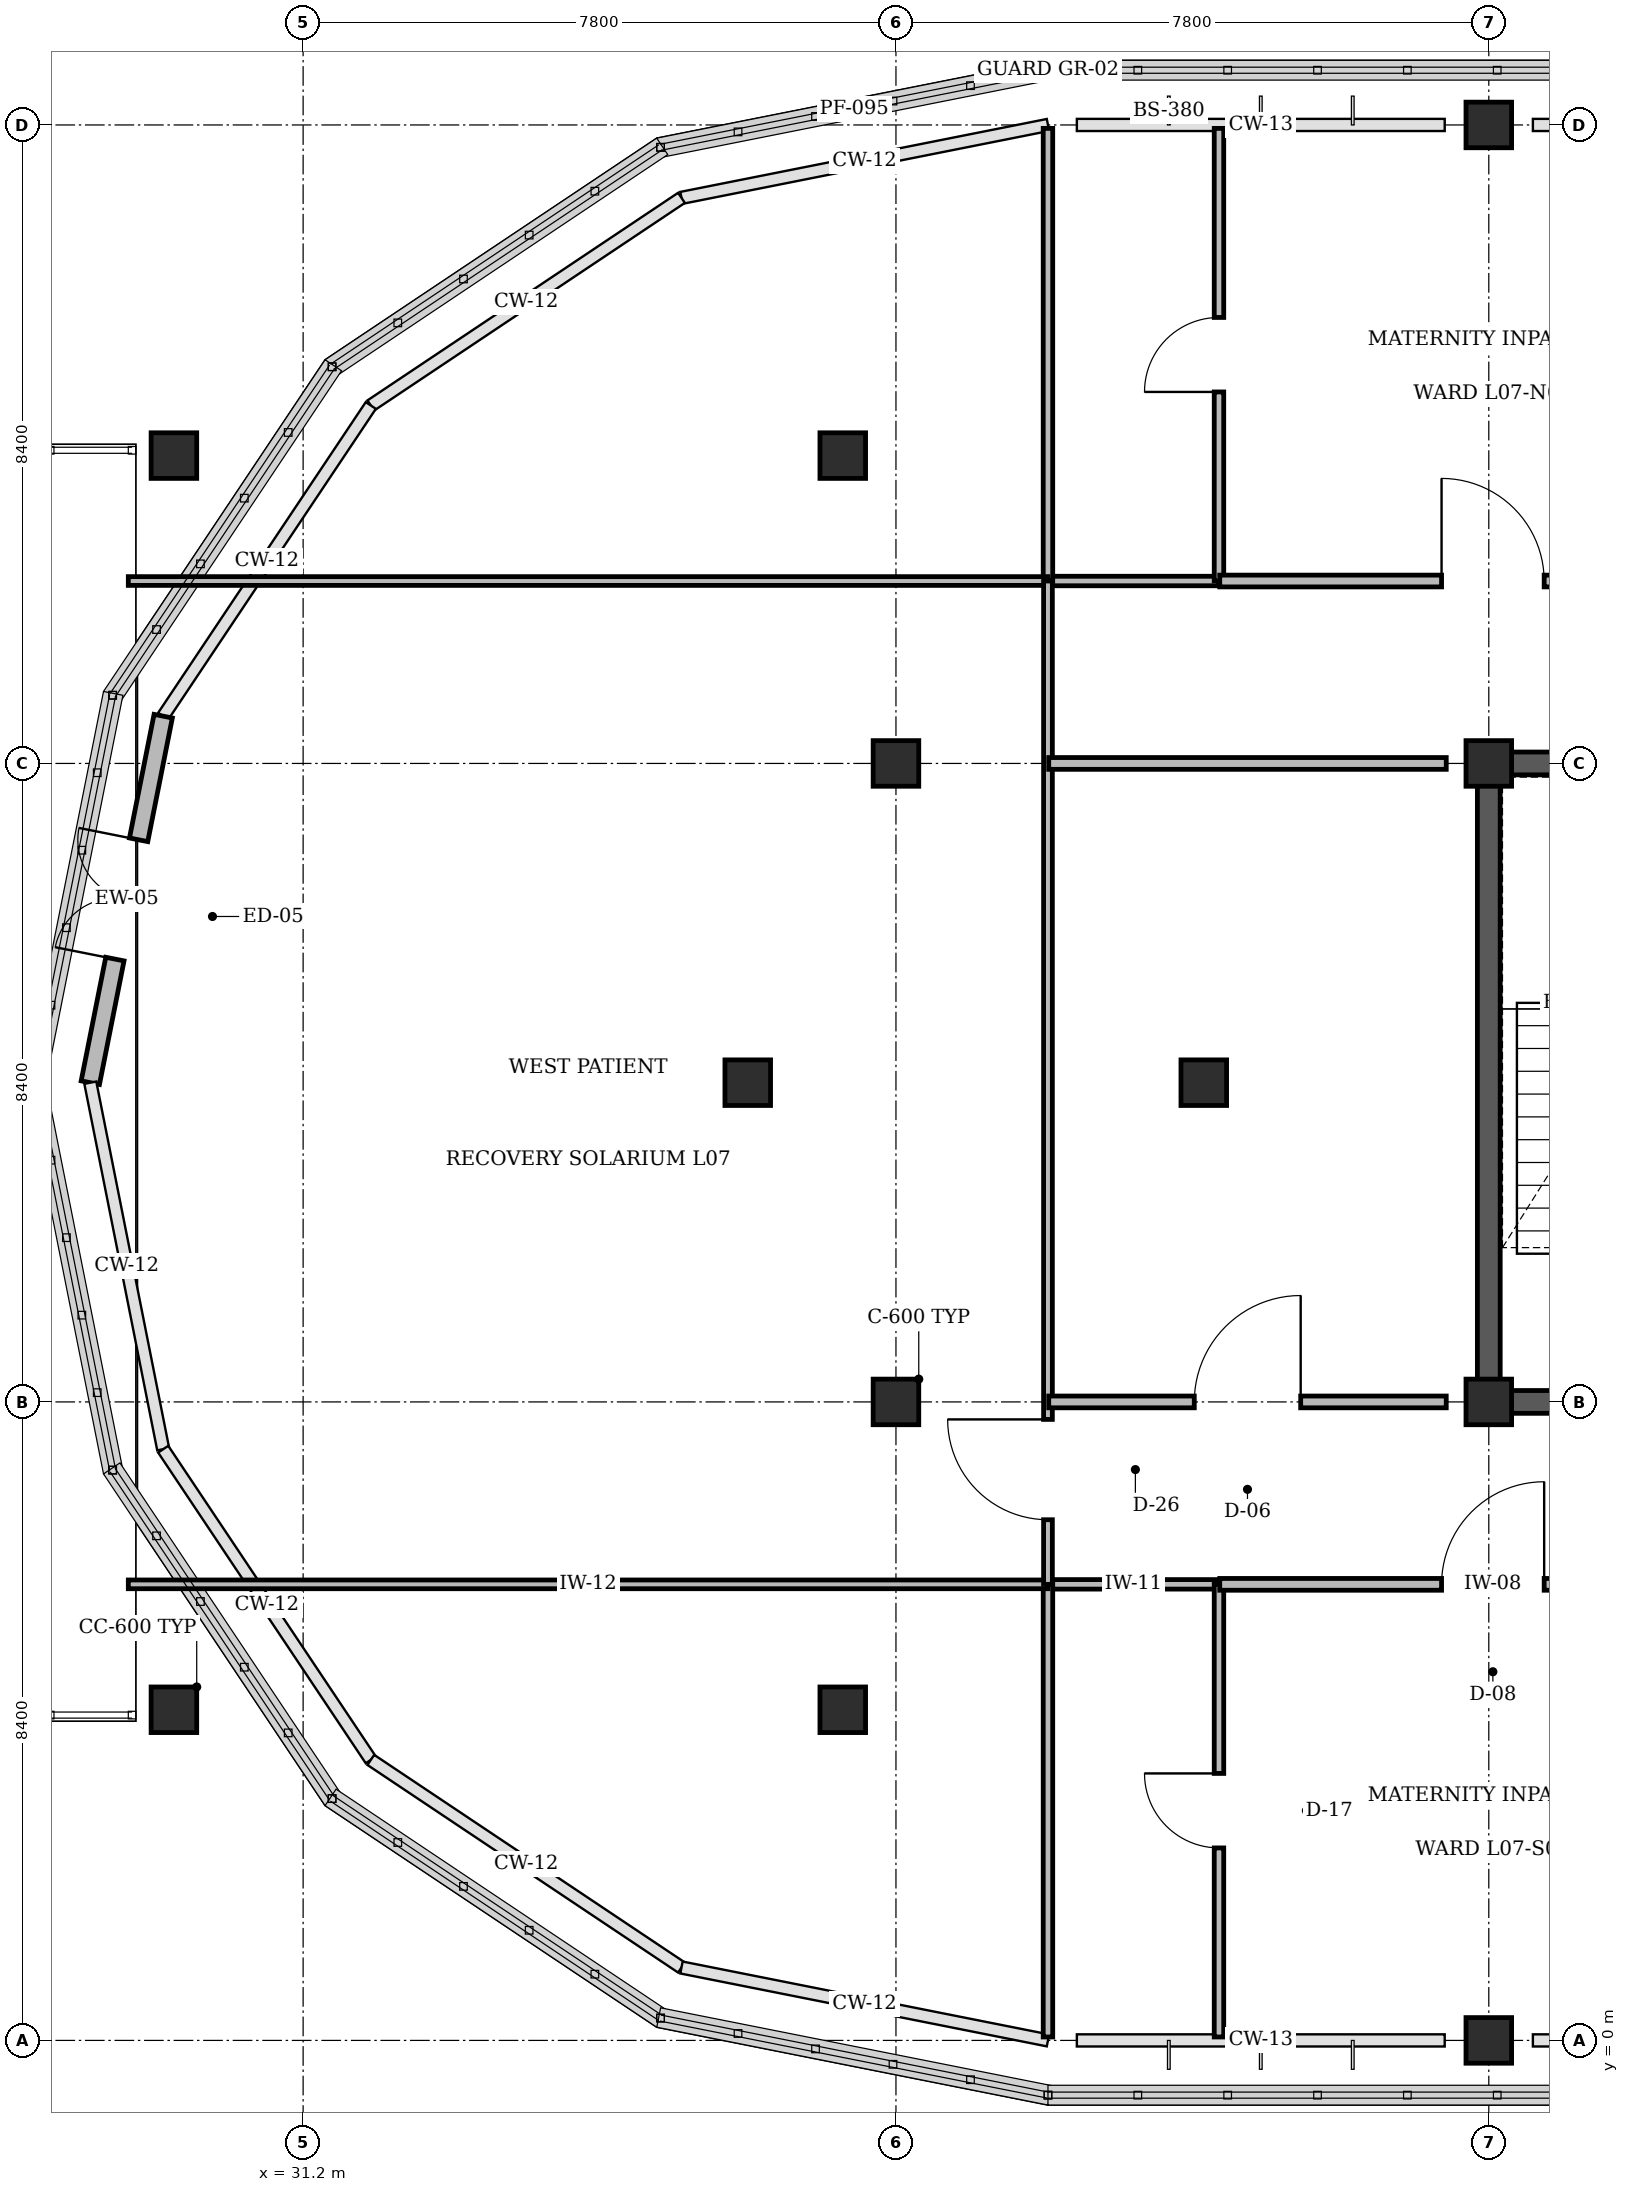
"""IFC4 building model, lengths in metres.
Left out: names, types, materials, properties, quantities, classifications, styles, units other than length and angle.
Written with IfcOpenShell. Run it as: python <this file> out.ifc"""

import sys

from ifc_helpers import new_model, si_unit, direction, frame, frame_2d, origin, origin_2d, place, context, subcontext, project, spatial, rectangle, circle, extrude, element, fill, save


model = new_model("IFC4")
c1 = context("Model", 3, precision=1e-05, world=origin(), true_north=direction((0.0, 1.0)))
c2 = subcontext(c1, "Body", "Model", "MODEL_VIEW")
j1 = project(units=[si_unit("LENGTHUNIT", "METRE"), si_unit("PLANEANGLEUNIT", "RADIAN")], contexts=[c1])
p1 = place(None, origin())
s1 = spatial("IfcSite", under=j1, at=p1, CompositionType="ELEMENT")
p2 = place(p1, origin())
s2 = spatial("IfcBuilding", under=s1, at=p2, CompositionType="ELEMENT")
p3 = place(p2, frame((0.0, 0.0, 30.6)))
s3 = spatial("IfcBuildingStorey", under=s2, at=p3, CompositionType="ELEMENT", Elevation=30.6)
p4 = place(p3, frame((46.65, 16.8, 0.0), z_axis=(0.0, 0.0, 1.0), x_axis=(1.0, 0.0, 0.0)))
e1 = element("IfcWall", 1, at=p4, inside=s3, PredefinedType="SHEAR", context=c2, shape_type="SweptSolid", body=[
    extrude(rectangle(XDim=8.1, YDim=0.3, at=frame_2d((4.05, 0.0))), origin(), (0.0, 0.0, 1.0), 3.92),
])
p5 = place(p3, frame((46.8, 8.4, 0.0), z_axis=(0.0, 0.0, 1.0), x_axis=(0.0, 1.0, 0.0)))
e2 = element("IfcWall", 2, at=p5, inside=s3, PredefinedType="SHEAR", context=c2, shape_type="SweptSolid", body=[
    extrude(rectangle(XDim=8.4, YDim=0.3, at=frame_2d((4.2, 0.0))), origin(), (0.0, 0.0, 1.0), 3.92),
])
for number, where, z_axis, x_axis in (
    (3, (39.0, 8.4, 0.0), (0.0, 0.0, 1.0), (1.0, 0.0, 0.0)),
    (4, (39.0, 16.8, 0.0), (0.0, 0.0, 1.0), (1.0, 0.0, 0.0)),
    (5, (46.8, 0.0, 0.0), (0.0, 0.0, 1.0), (1.0, 0.0, 0.0)),
    (6, (46.8, 8.4, 0.0), (0.0, 0.0, 1.0), (1.0, 0.0, 0.0)),
    (7, (46.8, 16.8, 0.0), (0.0, 0.0, 1.0), (1.0, 0.0, 0.0)),
    (8, (46.8, 25.2, 0.0), (0.0, 0.0, 1.0), (1.0, 0.0, 0.0)),
):
    element("IfcColumn", number, at=place(p3, frame(where, z_axis=z_axis, x_axis=x_axis)), inside=s3, PredefinedType="COLUMN", context=c2, shape_type="SweptSolid", body=[
        extrude(rectangle(XDim=0.6, YDim=0.6, at=origin_2d()), origin(), (0.0, 0.0, 1.0), 4.2),
    ])
for number, where, z_axis, x_axis in (
    (9, (29.5, 4.35, 0.0), (0.0, 0.0, 1.0), (1.0, 0.0, 0.0)),
    (10, (29.5, 20.85, 0.0), (0.0, 0.0, 1.0), (1.0, 0.0, 0.0)),
    (11, (37.05, 12.6, 0.0), (0.0, 0.0, 1.0), (1.0, 0.0, 0.0)),
):
    element("IfcColumn", number, at=place(p3, frame(where, z_axis=z_axis, x_axis=x_axis)), inside=s3, PredefinedType="PILASTER", context=c2, shape_type="SweptSolid", body=[
        extrude(circle(Radius=0.3, at=origin_2d()), origin(), (0.0, 0.0, 1.0), 3.95),
    ])
for number, where, z_axis, x_axis in (
    (12, (38.3, 4.35, 0.0), (0.0, 0.0, 1.0), (1.0, 0.0, 0.0)),
    (13, (38.3, 20.85, 0.0), (0.0, 0.0, 1.0), (1.0, 0.0, 0.0)),
    (14, (43.05, 12.6, 0.0), (0.0, 0.0, 1.0), (1.0, 0.0, 0.0)),
):
    element("IfcColumn", number, at=place(p3, frame(where, z_axis=z_axis, x_axis=x_axis)), inside=s3, PredefinedType="PILASTER", context=c2, shape_type="SweptSolid", body=[
        extrude(circle(Radius=0.3, at=origin_2d()), origin(), (0.0, 0.0, 1.0), 4.2),
    ])
p6 = place(p3, frame((28.4, 12.6, 0.0), z_axis=(0.0, 0.0, 1.0), x_axis=(0.195113286981, 0.980780712108, 0.0)))
e15 = element("IfcWall", 15, at=p6, inside=s3, PredefinedType="STANDARD", context=c2, shape_type="SweptSolid", body=[
    extrude(rectangle(XDim=4.916, YDim=0.245, at=frame_2d((2.458, 0.0))), origin(), (0.0, 0.0, 1.0), 3.32),
])
p7 = place(p6, frame((1.658, 0.0, 0.0)))
e16 = element("IfcOpeningElement", 16, at=p7, cuts=e15, PredefinedType="OPENING", context=c2, shape_type="SweptSolid", body=[
    extrude(rectangle(XDim=1.6, YDim=2.2, at=frame_2d((0.8, 1.1))), frame((0.0, 0.133, 0.0), z_axis=(0.0, -1.0, 0.0), x_axis=(1.0, 0.0, 0.0)), (0.0, 0.0, 1.0), 0.265),
])
p8 = place(p3, frame((46.8, 8.4, 0.0), z_axis=(0.0, 0.0, 1.0), x_axis=(1.0, 0.0, 0.0)))
e17 = element("IfcWall", 17, at=p8, inside=s3, PredefinedType="SHEAR", context=c2, shape_type="SweptSolid", body=[
    extrude(rectangle(XDim=4.15, YDim=0.3, at=frame_2d((2.075, 0.0))), origin(), (0.0, 0.0, 1.0), 4.2),
])
p9 = place(p8, frame((1.515, 0.0, 0.0)))
e18 = element("IfcOpeningElement", 18, at=p9, cuts=e17, PredefinedType="OPENING", context=c2, shape_type="SweptSolid", body=[
    extrude(rectangle(XDim=1.12, YDim=2.15, at=frame_2d((0.56, 1.075))), frame((0.0, 0.16, 0.0), z_axis=(0.0, -1.0, 0.0), x_axis=(1.0, 0.0, 0.0)), (0.0, 0.0, 1.0), 0.32),
])
p10 = place(p3, frame((41.0, 6.0, 0.0), z_axis=(0.0, 0.0, 1.0), x_axis=(1.0, 0.0, 0.0)))
e19 = element("IfcWall", 19, at=p10, inside=s3, PredefinedType="PARTITIONING", context=c2, shape_type="SweptSolid", body=[
    extrude(rectangle(XDim=2.25, YDim=0.125, at=frame_2d((1.125, 0.0))), origin(), (0.0, 0.0, 1.0), 3.9),
])
p11 = place(p3, frame((41.0, 0.045, 0.0), z_axis=(0.0, 0.0, 1.0), x_axis=(0.0, 1.0, 0.0)))
e20 = element("IfcWall", 20, at=p11, inside=s3, PredefinedType="PARTITIONING", context=c2, shape_type="SweptSolid", body=[
    extrude(rectangle(XDim=5.955, YDim=0.125, at=frame_2d((2.978, 0.0))), origin(), (0.0, 0.0, 1.0), 3.9),
])
p12 = place(p3, frame((43.25, 0.045, 0.0), z_axis=(0.0, 0.0, 1.0), x_axis=(0.0, 1.0, 0.0)))
e21 = element("IfcWall", 21, at=p12, inside=s3, PredefinedType="PARTITIONING", context=c2, shape_type="SweptSolid", body=[
    extrude(rectangle(XDim=5.955, YDim=0.125, at=frame_2d((2.978, 0.0))), origin(), (0.0, 0.0, 1.0), 3.9),
])
p13 = place(p12, frame((2.488, 0.0, 0.0)))
e22 = element("IfcOpeningElement", 22, at=p13, cuts=e21, PredefinedType="OPENING", context=c2, shape_type="SweptSolid", body=[
    extrude(rectangle(XDim=0.98, YDim=2.1, at=frame_2d((0.49, 1.05))), frame((0.0, 0.073, 0.0), z_axis=(0.0, -1.0, 0.0), x_axis=(1.0, 0.0, 0.0)), (0.0, 0.0, 1.0), 0.145),
])
p14 = place(p3, frame((41.0, 19.2, 0.0), z_axis=(0.0, 0.0, 1.0), x_axis=(1.0, 0.0, 0.0)))
e23 = element("IfcWall", 23, at=p14, inside=s3, PredefinedType="PARTITIONING", context=c2, shape_type="SweptSolid", body=[
    extrude(rectangle(XDim=2.25, YDim=0.125, at=frame_2d((1.125, 0.0))), origin(), (0.0, 0.0, 1.0), 3.9),
])
p15 = place(p3, frame((41.0, 19.2, 0.0), z_axis=(0.0, 0.0, 1.0), x_axis=(0.0, 1.0, 0.0)))
e24 = element("IfcWall", 24, at=p15, inside=s3, PredefinedType="PARTITIONING", context=c2, shape_type="SweptSolid", body=[
    extrude(rectangle(XDim=5.955, YDim=0.125, at=frame_2d((2.978, 0.0))), origin(), (0.0, 0.0, 1.0), 3.9),
])
p16 = place(p3, frame((43.25, 19.2, 0.0), z_axis=(0.0, 0.0, 1.0), x_axis=(0.0, 1.0, 0.0)))
e25 = element("IfcWall", 25, at=p16, inside=s3, PredefinedType="PARTITIONING", context=c2, shape_type="SweptSolid", body=[
    extrude(rectangle(XDim=5.955, YDim=0.125, at=frame_2d((2.978, 0.0))), origin(), (0.0, 0.0, 1.0), 3.9),
])
p17 = place(p16, frame((2.488, 0.0, 0.0)))
e26 = element("IfcOpeningElement", 26, at=p17, cuts=e25, PredefinedType="OPENING", context=c2, shape_type="SweptSolid", body=[
    extrude(rectangle(XDim=0.98, YDim=2.1, at=frame_2d((0.49, 1.05))), frame((0.0, 0.073, 0.0), z_axis=(0.0, -1.0, 0.0), x_axis=(1.0, 0.0, 0.0)), (0.0, 0.0, 1.0), 0.145),
])
for number, where, z_axis, x_axis in (
    (27, (28.9, 6.0, 0.0), (0.0, 0.0, 1.0), (1.0, 0.0, 0.0)),
    (28, (28.9, 19.2, 0.0), (0.0, 0.0, 1.0), (1.0, 0.0, 0.0)),
):
    element("IfcWall", number, at=place(p3, frame(where, z_axis=z_axis, x_axis=x_axis)), inside=s3, PredefinedType="PARTITIONING", context=c2, shape_type="SweptSolid", body=[
        extrude(rectangle(XDim=12.1, YDim=0.115, at=frame_2d((6.05, 0.0))), origin(), (0.0, 0.0, 1.0), 3.9),
    ])
p18 = place(p3, frame((41.0, 6.0, 0.0), z_axis=(0.0, 0.0, 1.0), x_axis=(0.0, 1.0, 0.0)))
e29 = element("IfcWall", 29, at=p18, inside=s3, PredefinedType="PARTITIONING", context=c2, shape_type="SweptSolid", body=[
    extrude(rectangle(XDim=13.2, YDim=0.115, at=frame_2d((6.6, 0.0))), origin(), (0.0, 0.0, 1.0), 3.9),
])
p19 = place(p18, frame((0.85, 0.0, 0.0)))
e30 = element("IfcOpeningElement", 30, at=p19, cuts=e29, PredefinedType="OPENING", context=c2, shape_type="SweptSolid", body=[
    extrude(rectangle(XDim=1.32, YDim=2.15, at=frame_2d((0.66, 1.075))), frame((0.0, 0.067, 0.0), z_axis=(0.0, -1.0, 0.0), x_axis=(1.0, 0.0, 0.0)), (0.0, 0.0, 1.0), 0.135),
])
p20 = place(p3, frame((43.26, 6.0, 0.0), z_axis=(0.0, 0.0, 1.0), x_axis=(1.0, 0.0, 0.0)))
e31 = element("IfcWall", 31, at=p20, inside=s3, PredefinedType="PARTITIONING", context=c2, shape_type="SweptSolid", body=[
    extrude(rectangle(XDim=7.187, YDim=0.155, at=frame_2d((3.594, 0.0))), origin(), (0.0, 0.0, 1.0), 3.9),
])
p21 = place(p20, frame((2.918, 0.0, 0.0)))
e32 = element("IfcOpeningElement", 32, at=p21, cuts=e31, PredefinedType="OPENING", context=c2, shape_type="SweptSolid", body=[
    extrude(rectangle(XDim=1.35, YDim=2.2, at=frame_2d((0.675, 1.1))), frame((0.0, 0.087, 0.0), z_axis=(0.0, -1.0, 0.0), x_axis=(1.0, 0.0, 0.0)), (0.0, 0.0, 1.0), 0.175),
])
p22 = place(p3, frame((43.26, 19.2, 0.0), z_axis=(0.0, 0.0, 1.0), x_axis=(1.0, 0.0, 0.0)))
e33 = element("IfcWall", 33, at=p22, inside=s3, PredefinedType="PARTITIONING", context=c2, shape_type="SweptSolid", body=[
    extrude(rectangle(XDim=7.187, YDim=0.155, at=frame_2d((3.594, 0.0))), origin(), (0.0, 0.0, 1.0), 3.9),
])
p23 = place(p22, frame((2.918, 0.0, 0.0)))
e34 = element("IfcOpeningElement", 34, at=p23, cuts=e33, PredefinedType="OPENING", context=c2, shape_type="SweptSolid", body=[
    extrude(rectangle(XDim=1.35, YDim=2.2, at=frame_2d((0.675, 1.1))), frame((0.0, 0.087, 0.0), z_axis=(0.0, -1.0, 0.0), x_axis=(1.0, 0.0, 0.0)), (0.0, 0.0, 1.0), 0.175),
])
p24 = place(p3, frame((41.01, 8.4, 0.0), z_axis=(0.0, 0.0, 1.0), x_axis=(1.0, 0.0, 0.0)))
e35 = element("IfcWall", 35, at=p24, inside=s3, PredefinedType="PARTITIONING", context=c2, shape_type="SweptSolid", body=[
    extrude(rectangle(XDim=5.23, YDim=0.155, at=frame_2d((2.615, 0.0))), origin(), (0.0, 0.0, 1.0), 3.305),
])
p25 = place(p24, frame((1.915, 0.0, 0.0)))
e36 = element("IfcOpeningElement", 36, at=p25, cuts=e35, PredefinedType="OPENING", context=c2, shape_type="SweptSolid", body=[
    extrude(rectangle(XDim=1.4, YDim=2.2, at=frame_2d((0.7, 1.1))), frame((0.0, 0.087, 0.0), z_axis=(0.0, -1.0, 0.0), x_axis=(1.0, 0.0, 0.0)), (0.0, 0.0, 1.0), 0.175),
])
p26 = place(p3, frame((41.01, 16.8, 0.0), z_axis=(0.0, 0.0, 1.0), x_axis=(1.0, 0.0, 0.0)))
e37 = element("IfcWall", 37, at=p26, inside=s3, PredefinedType="PARTITIONING", context=c2, shape_type="SweptSolid", body=[
    extrude(rectangle(XDim=5.23, YDim=0.155, at=frame_2d((2.615, 0.0))), origin(), (0.0, 0.0, 1.0), 3.305),
])
p27 = place(p7, origin())
e38 = element("IfcDoor", 38, at=p27, inside=s3, OperationType="DOUBLE_DOOR_SINGLE_SWING", PredefinedType="DOOR", context=c2, shape_type="SweptSolid", body=[
    extrude(rectangle(XDim=1.6, YDim=2.2, at=frame_2d((0.8, 1.1))), frame((0.0, 0.025, 0.0), z_axis=(0.0, -1.0, 0.0), x_axis=(1.0, 0.0, 0.0)), (0.0, 0.0, 1.0), 0.05),
])
fill(e16, e38)
p28 = place(p13, origin())
e39 = element("IfcDoor", 39, at=p28, inside=s3, OperationType="SINGLE_SWING_RIGHT", PredefinedType="DOOR", context=c2, shape_type="SweptSolid", body=[
    extrude(rectangle(XDim=0.98, YDim=2.1, at=frame_2d((0.49, 1.05))), frame((0.0, 0.025, 0.0), z_axis=(0.0, -1.0, 0.0), x_axis=(1.0, 0.0, 0.0)), (0.0, 0.0, 1.0), 0.05),
])
fill(e22, e39)
p29 = place(p17, origin())
e40 = element("IfcDoor", 40, at=p29, inside=s3, OperationType="SINGLE_SWING_LEFT", PredefinedType="DOOR", context=c2, shape_type="SweptSolid", body=[
    extrude(rectangle(XDim=0.98, YDim=2.1, at=frame_2d((0.49, 1.05))), frame((0.0, 0.025, 0.0), z_axis=(0.0, -1.0, 0.0), x_axis=(1.0, 0.0, 0.0)), (0.0, 0.0, 1.0), 0.05),
])
fill(e26, e40)
p30 = place(p19, origin())
e41 = element("IfcDoor", 41, at=p30, inside=s3, OperationType="SINGLE_SWING_RIGHT", PredefinedType="DOOR", context=c2, shape_type="SweptSolid", body=[
    extrude(rectangle(XDim=1.32, YDim=2.15, at=frame_2d((0.66, 1.075))), frame((0.0, 0.025, 0.0), z_axis=(0.0, -1.0, 0.0), x_axis=(1.0, 0.0, 0.0)), (0.0, 0.0, 1.0), 0.05),
])
fill(e30, e41)
p31 = place(p21, origin())
e42 = element("IfcDoor", 42, at=p31, inside=s3, OperationType="SINGLE_SWING_RIGHT", PredefinedType="DOOR", context=c2, shape_type="SweptSolid", body=[
    extrude(rectangle(XDim=1.35, YDim=2.2, at=frame_2d((0.675, 1.1))), frame((0.0, 0.025, 0.0), z_axis=(0.0, -1.0, 0.0), x_axis=(1.0, 0.0, 0.0)), (0.0, 0.0, 1.0), 0.05),
])
fill(e32, e42)
p32 = place(p23, origin())
e43 = element("IfcDoor", 43, at=p32, inside=s3, OperationType="SINGLE_SWING_LEFT", PredefinedType="DOOR", context=c2, shape_type="SweptSolid", body=[
    extrude(rectangle(XDim=1.35, YDim=2.2, at=frame_2d((0.675, 1.1))), frame((0.0, 0.025, 0.0), z_axis=(0.0, -1.0, 0.0), x_axis=(1.0, 0.0, 0.0)), (0.0, 0.0, 1.0), 0.05),
])
fill(e34, e43)
p33 = place(p25, origin())
e44 = element("IfcDoor", 44, at=p33, inside=s3, OperationType="SINGLE_SWING_RIGHT", PredefinedType="DOOR", context=c2, shape_type="SweptSolid", body=[
    extrude(rectangle(XDim=1.4, YDim=2.2, at=frame_2d((0.7, 1.1))), frame((0.0, 0.025, 0.0), z_axis=(0.0, -1.0, 0.0), x_axis=(1.0, 0.0, 0.0)), (0.0, 0.0, 1.0), 0.05),
])
fill(e36, e44)
save(model, sys.argv[1])
